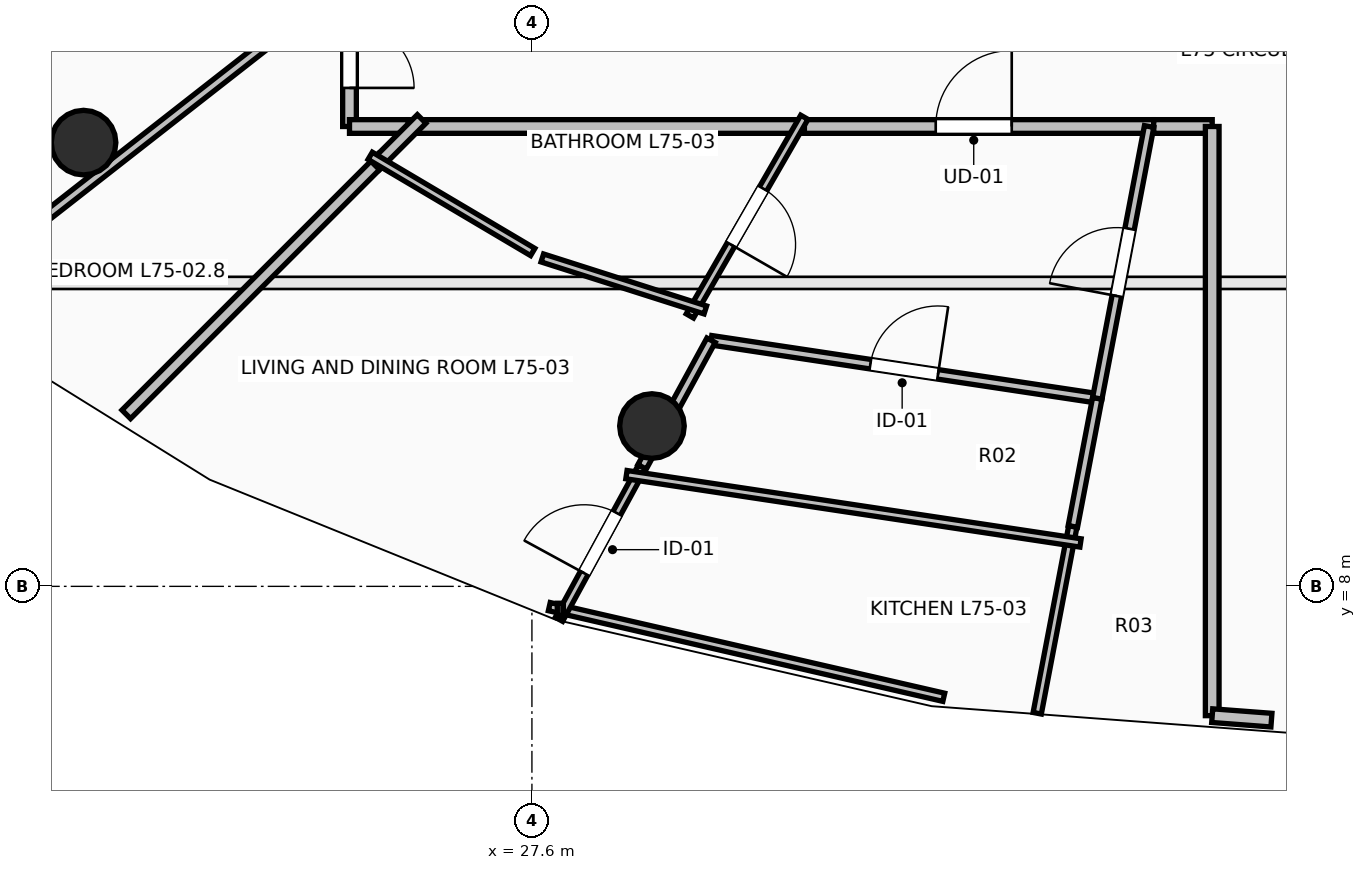
"""IFC4 building model, lengths in metres.
Left out: names, types, materials, properties, quantities, classifications, styles, units other than length and angle.
Written with IfcOpenShell. Run it as: python <this file> out.ifc"""

import sys

from ifc_helpers import new_model, si_unit, direction, frame, frame_2d, origin, origin_2d, place, context, subcontext, project, spatial, rectangle, circle, extrude, element, fill, save


model = new_model("IFC4")
c1 = context("Model", 3, precision=1e-05, world=origin(), true_north=direction((0.0, 1.0)))
c2 = subcontext(c1, "Body", "Model", "MODEL_VIEW")
j1 = project(units=[si_unit("LENGTHUNIT", "METRE"), si_unit("PLANEANGLEUNIT", "RADIAN")], contexts=[c1])
p1 = place(None, origin())
s1 = spatial("IfcSite", under=j1, at=p1, CompositionType="ELEMENT")
p2 = place(p1, origin())
s2 = spatial("IfcBuilding", under=s1, at=p2, CompositionType="ELEMENT")
p3 = place(p2, frame((0.0, 0.0, 276.85)))
s3 = spatial("IfcBuildingStorey", under=s2, at=p3, CompositionType="ELEMENT", Elevation=276.85)
for number, where, z_axis, x_axis in (
    (1, (21.701, 13.838, 0.0), (0.0, 0.0, 1.0), (-0.707, -0.707, 0.0)),
    (2, (29.179, 10.109, 0.0), (0.0, 0.0, 1.0), (-0.383, -0.924, 0.0)),
):
    element("IfcColumn", number, at=place(p3, frame(where, z_axis=z_axis, x_axis=x_axis)), inside=s3, PredefinedType="COLUMN", context=c2, shape_type="SweptSolid", body=[
        extrude(circle(Radius=0.425, at=origin_2d()), origin(), (0.0, 0.0, 1.0), 3.55),
    ])
p4 = place(p3, frame((25.2, 15.915, 0.0), z_axis=(0.0, 0.0, 1.0), x_axis=(0.0, -1.0, 0.0)))
e3 = element("IfcWall", 3, at=p4, inside=s3, PredefinedType="PARTITIONING", context=c2, shape_type="SweptSolid", body=[
    extrude(rectangle(XDim=1.865, YDim=0.18, at=frame_2d((0.933, 0.0))), origin(), (0.0, 0.0, 1.0), 2.382),
])
p5 = place(p4, frame((0.508, 0.0, 0.0)))
e4 = element("IfcOpeningElement", 4, at=p5, cuts=e3, PredefinedType="OPENING", context=c2, shape_type="SweptSolid", body=[
    extrude(rectangle(XDim=0.85, YDim=2.1, at=frame_2d((0.425, 1.05))), frame((0.0, 0.105, 0.0), z_axis=(0.0, -1.0, 0.0), x_axis=(1.0, 0.0, 0.0)), (0.0, 0.0, 1.0), 0.21),
])
p6 = place(p3, frame((25.2, 14.05, 0.0), z_axis=(0.0, 0.0, 1.0), x_axis=(1.0, 0.0, 0.0)))
e5 = element("IfcWall", 5, at=p6, inside=s3, PredefinedType="PARTITIONING", context=c2, shape_type="SweptSolid", body=[
    extrude(rectangle(XDim=0.91, YDim=0.18, at=frame_2d((0.455, 0.0))), origin(), (0.0, 0.0, 1.0), 3.19),
])
p7 = place(p3, frame((31.045, 14.05, 0.0), z_axis=(0.0, 0.0, 1.0), x_axis=(1.0, 0.0, 0.0)))
e6 = element("IfcWall", 6, at=p7, inside=s3, PredefinedType="PARTITIONING", context=c2, shape_type="SweptSolid", body=[
    extrude(rectangle(XDim=4.735, YDim=0.18, at=frame_2d((2.368, 0.0))), origin(), (0.0, 0.0, 1.0), 3.19),
])
p8 = place(p7, frame((1.867, 0.0, 0.0)))
e7 = element("IfcOpeningElement", 7, at=p8, cuts=e6, PredefinedType="OPENING", context=c2, shape_type="SweptSolid", body=[
    extrude(rectangle(XDim=1.0, YDim=2.15, at=frame_2d((0.5, 1.075))), frame((0.0, 0.105, 0.0), z_axis=(0.0, -1.0, 0.0), x_axis=(1.0, 0.0, 0.0)), (0.0, 0.0, 1.0), 0.21),
])
p9 = place(p3, frame((25.97, 14.05, 0.0), z_axis=(0.0, 0.0, 1.0), x_axis=(1.0, 0.0, 0.0)))
e8 = element("IfcWall", 8, at=p9, inside=s3, PredefinedType="PARTITIONING", context=c2, shape_type="SweptSolid", body=[
    extrude(rectangle(XDim=5.215, YDim=0.18, at=frame_2d((2.607, 0.0))), origin(), (0.0, 0.0, 1.0), 2.382),
])
p10 = place(p3, frame((35.78, 14.05, 0.0), z_axis=(0.0, 0.0, 1.0), x_axis=(1.0, 0.0, 0.0)))
e9 = element("IfcWall", 9, at=p10, inside=s3, PredefinedType="PARTITIONING", context=c2, shape_type="SweptSolid", body=[
    extrude(rectangle(XDim=0.77, YDim=0.18, at=frame_2d((0.385, 0.0))), origin(), (0.0, 0.0, 1.0), 3.19),
])
p11 = place(p3, frame((36.55, 14.05, 0.0), z_axis=(0.0, 0.0, 1.0), x_axis=(0.0, -1.0, 0.0)))
e10 = element("IfcWall", 10, at=p11, inside=s3, PredefinedType="PARTITIONING", context=c2, shape_type="SweptSolid", body=[
    extrude(rectangle(XDim=7.751, YDim=0.18, at=frame_2d((3.875, 0.0))), origin(), (0.0, 0.0, 1.0), 3.19),
])
p12 = place(p3, frame((36.55, 6.299, 0.0), z_axis=(0.0, 0.0, 1.0), x_axis=(0.997136622012, -0.0756211415, 0.0)))
e11 = element("IfcWall", 11, at=p12, inside=s3, PredefinedType="PARTITIONING", context=c2, shape_type="SweptSolid", body=[
    extrude(rectangle(XDim=0.781, YDim=0.18, at=frame_2d((0.391, 0.0))), origin(), (0.0, 0.0, 1.0), 3.19),
])
p13 = place(p3, frame((17.602, 13.72, 0.0), z_axis=(0.0, 0.0, 1.0), x_axis=(0.856734134601, 0.515758298633, 0.0)))
e12 = element("IfcWall", 12, at=p13, inside=s3, PredefinedType="PARTITIONING", context=c2, shape_type="SweptSolid", body=[
    extrude(rectangle(XDim=8.868, YDim=0.125, at=frame_2d((4.434, 0.0))), origin(), (0.0, 0.0, 1.0), 2.382),
])
p14 = place(p3, frame((19.819, 11.782, 0.0), z_axis=(0.0, 0.0, 1.0), x_axis=(0.78765580417, 0.61611552014, 0.0)))
e13 = element("IfcWall", 13, at=p14, inside=s3, PredefinedType="PARTITIONING", context=c2, shape_type="SweptSolid", body=[
    extrude(rectangle(XDim=6.832, YDim=0.125, at=frame_2d((3.416, 0.0))), origin(), (0.0, 0.0, 1.0), 2.382),
])
p15 = place(p3, frame((22.263, 10.263, 0.0), z_axis=(0.0, 0.0, 1.0), x_axis=(0.707106781187, 0.707106781187, 0.0)))
e14 = element("IfcWall", 14, at=p15, inside=s3, PredefinedType="PARTITIONING", context=c2, shape_type="SweptSolid", body=[
    extrude(rectangle(XDim=4.771, YDim=0.16, at=frame_2d((2.386, 0.0))), origin(), (0.0, 0.0, 1.0), 2.774),
])
p16 = place(p3, frame((25.538, 13.538, 0.0), z_axis=(0.0, 0.0, 1.0), x_axis=(0.707106781187, 0.707106781187, 0.0)))
e15 = element("IfcWall", 15, at=p16, inside=s3, PredefinedType="PARTITIONING", context=c2, shape_type="SweptSolid", body=[
    extrude(rectangle(XDim=0.864, YDim=0.16, at=frame_2d((0.432, 0.0))), origin(), (0.0, 0.0, 1.0), 3.19),
])
p17 = place(p3, frame((31.184, 14.171, 0.0), z_axis=(0.0, 0.0, 1.0), x_axis=(-0.499203880251, -0.86648455609, 0.0)))
e16 = element("IfcWall", 16, at=p17, inside=s3, PredefinedType="PARTITIONING", context=c2, shape_type="SweptSolid", body=[
    extrude(rectangle(XDim=3.017, YDim=0.11, at=frame_2d((1.508, 0.0))), origin(), (0.0, 0.0, 1.0), 3.19),
])
p18 = place(p17, frame((1.083, 0.0, 0.0)))
e17 = element("IfcOpeningElement", 17, at=p18, cuts=e16, PredefinedType="OPENING", context=c2, shape_type="SweptSolid", body=[
    extrude(rectangle(XDim=0.85, YDim=2.1, at=frame_2d((0.425, 1.05))), frame((0.0, 0.07, 0.0), z_axis=(0.0, -1.0, 0.0), x_axis=(1.0, 0.0, 0.0)), (0.0, 0.0, 1.0), 0.14),
])
p19 = place(p3, frame((29.881, 11.636, 0.0), z_axis=(0.0, 0.0, 1.0), x_axis=(-0.952713330874, 0.30387054674, 0.0)))
e18 = element("IfcWall", 18, at=p19, inside=s3, PredefinedType="PARTITIONING", context=c2, shape_type="SweptSolid", body=[
    extrude(rectangle(XDim=2.251, YDim=0.11, at=frame_2d((1.125, 0.0))), origin(), (0.0, 0.0, 1.0), 2.382),
])
p20 = place(p3, frame((27.611, 12.399, 0.0), z_axis=(0.0, 0.0, 1.0), x_axis=(-0.860546797705, 0.509371386082, 0.0)))
e19 = element("IfcWall", 19, at=p20, inside=s3, PredefinedType="PARTITIONING", context=c2, shape_type="SweptSolid", body=[
    extrude(rectangle(XDim=2.485, YDim=0.11, at=frame_2d((1.242, 0.0))), origin(), (0.0, 0.0, 1.0), 3.19),
])
p21 = place(p3, frame((34.716, 8.789, 0.0), z_axis=(0.0, 0.0, 1.0), x_axis=(-0.187233159216, -0.982315501298, 0.0)))
e20 = element("IfcWall", 20, at=p21, inside=s3, PredefinedType="PARTITIONING", context=c2, shape_type="SweptSolid", body=[
    extrude(rectangle(XDim=2.502, YDim=0.11, at=frame_2d((1.251, 0.0))), origin(), (0.0, 0.0, 1.0), 3.19),
])
p22 = place(p3, frame((27.829, 7.733, 0.0), z_axis=(0.0, 0.0, 1.0), x_axis=(0.974586324437, -0.224012268015, 0.0)))
e21 = element("IfcWall", 21, at=p22, inside=s3, PredefinedType="PARTITIONING", context=c2, shape_type="SweptSolid", body=[
    extrude(rectangle(XDim=5.325, YDim=0.11, at=frame_2d((2.663, 0.0))), origin(), (0.0, 0.0, 1.0), 3.19),
])
p23 = place(p3, frame((27.956, 7.566, 0.0), z_axis=(0.0, 0.0, 1.0), x_axis=(0.478485169604, 0.878095634011, 0.0)))
e22 = element("IfcWall", 22, at=p23, inside=s3, PredefinedType="PARTITIONING", context=c2, shape_type="SweptSolid", body=[
    extrude(rectangle(XDim=2.284, YDim=0.11, at=frame_2d((1.142, 0.0))), origin(), (0.0, 0.0, 1.0), 3.19),
])
p24 = place(p23, frame((0.692, 0.0, 0.0)))
e23 = element("IfcOpeningElement", 23, at=p24, cuts=e22, PredefinedType="OPENING", context=c2, shape_type="SweptSolid", body=[
    extrude(rectangle(XDim=0.9, YDim=2.1, at=frame_2d((0.45, 1.05))), frame((0.0, 0.07, 0.0), z_axis=(0.0, -1.0, 0.0), x_axis=(1.0, 0.0, 0.0)), (0.0, 0.0, 1.0), 0.14),
])
p25 = place(p3, frame((29.957, 11.238, 0.0), z_axis=(0.0, 0.0, 1.0), x_axis=(0.988886109078, -0.148675025721, 0.0)))
e24 = element("IfcWall", 24, at=p25, inside=s3, PredefinedType="PARTITIONING", context=c2, shape_type="SweptSolid", body=[
    extrude(rectangle(XDim=5.138, YDim=0.125, at=frame_2d((2.569, 0.0))), origin(), (0.0, 0.0, 1.0), 3.19),
])
p26 = place(p25, frame((2.119, 0.0, 0.0)))
e25 = element("IfcOpeningElement", 25, at=p26, cuts=e24, PredefinedType="OPENING", context=c2, shape_type="SweptSolid", body=[
    extrude(rectangle(XDim=0.9, YDim=2.1, at=frame_2d((0.45, 1.05))), frame((0.0, 0.077, 0.0), z_axis=(0.0, -1.0, 0.0), x_axis=(1.0, 0.0, 0.0)), (0.0, 0.0, 1.0), 0.155),
])
p27 = place(p3, frame((35.038, 10.474, 0.0), z_axis=(0.0, 0.0, 1.0), x_axis=(-0.187353972187, -0.982292466176, 0.0)))
e26 = element("IfcWall", 26, at=p27, inside=s3, PredefinedType="PARTITIONING", context=c2, shape_type="SweptSolid", body=[
    extrude(rectangle(XDim=1.716, YDim=0.125, at=frame_2d((0.858, 0.0))), origin(), (0.0, 0.0, 1.0), 3.19),
])
p28 = place(p3, frame((29.049, 9.572, 0.0), z_axis=(0.0, 0.0, 1.0), x_axis=(0.478536562944, 0.878067627194, 0.0)))
e27 = element("IfcWall", 27, at=p28, inside=s3, PredefinedType="PARTITIONING", context=c2, shape_type="SweptSolid", body=[
    extrude(rectangle(XDim=1.897, YDim=0.125, at=frame_2d((0.949, 0.0))), origin(), (0.0, 0.0, 1.0), 3.19),
])
p29 = place(p3, frame((35.038, 10.474, 0.0), z_axis=(0.0, 0.0, 1.0), x_axis=(0.187312418361, 0.982300390882, 0.0)))
e28 = element("IfcWall", 28, at=p29, inside=s3, PredefinedType="PARTITIONING", context=c2, shape_type="SweptSolid", body=[
    extrude(rectangle(XDim=3.64, YDim=0.125, at=frame_2d((1.82, 0.0))), origin(), (0.0, 0.0, 1.0), 3.19),
])
p30 = place(p29, frame((1.37, 0.0, 0.0)))
e29 = element("IfcOpeningElement", 29, at=p30, cuts=e28, PredefinedType="OPENING", context=c2, shape_type="SweptSolid", body=[
    extrude(rectangle(XDim=0.9, YDim=2.1, at=frame_2d((0.45, 1.05))), frame((0.0, 0.077, 0.0), z_axis=(0.0, -1.0, 0.0), x_axis=(1.0, 0.0, 0.0)), (0.0, 0.0, 1.0), 0.155),
])
p31 = place(p3, frame((34.817, 8.571, 0.0), z_axis=(0.0, 0.0, 1.0), x_axis=(-0.988879067965, 0.148721850918, 0.0)))
e30 = element("IfcWall", 30, at=p31, inside=s3, PredefinedType="PARTITIONING", context=c2, shape_type="SweptSolid", body=[
    extrude(rectangle(XDim=6.041, YDim=0.11, at=frame_2d((3.021, 0.0))), origin(), (0.0, 0.0, 1.0), 3.19),
])
p32 = place(p8, origin())
e31 = element("IfcDoor", 31, at=p32, inside=s3, OperationType="SINGLE_SWING_RIGHT", PredefinedType="DOOR", context=c2, shape_type="SweptSolid", body=[
    extrude(rectangle(XDim=1.0, YDim=2.15, at=frame_2d((0.5, 1.075))), frame((0.0, 0.025, 0.0), z_axis=(0.0, -1.0, 0.0), x_axis=(1.0, 0.0, 0.0)), (0.0, 0.0, 1.0), 0.05),
])
fill(e7, e31)
p33 = place(p18, origin())
e32 = element("IfcDoor", 32, at=p33, inside=s3, OperationType="SINGLE_SWING_RIGHT", PredefinedType="DOOR", context=c2, shape_type="SweptSolid", body=[
    extrude(rectangle(XDim=0.85, YDim=2.1, at=frame_2d((0.425, 1.05))), frame((0.0, 0.025, 0.0), z_axis=(0.0, -1.0, 0.0), x_axis=(1.0, 0.0, 0.0)), (0.0, 0.0, 1.0), 0.05),
])
fill(e17, e32)
p34 = place(p24, origin())
e33 = element("IfcDoor", 33, at=p34, inside=s3, OperationType="SINGLE_SWING_LEFT", PredefinedType="DOOR", context=c2, shape_type="SweptSolid", body=[
    extrude(rectangle(XDim=0.9, YDim=2.1, at=frame_2d((0.45, 1.05))), frame((0.0, 0.025, 0.0), z_axis=(0.0, -1.0, 0.0), x_axis=(1.0, 0.0, 0.0)), (0.0, 0.0, 1.0), 0.05),
])
fill(e23, e33)
p35 = place(p26, origin())
e34 = element("IfcDoor", 34, at=p35, inside=s3, OperationType="SINGLE_SWING_RIGHT", PredefinedType="DOOR", context=c2, shape_type="SweptSolid", body=[
    extrude(rectangle(XDim=0.9, YDim=2.1, at=frame_2d((0.45, 1.05))), frame((0.0, 0.025, 0.0), z_axis=(0.0, -1.0, 0.0), x_axis=(1.0, 0.0, 0.0)), (0.0, 0.0, 1.0), 0.05),
])
fill(e25, e34)
p36 = place(p30, origin())
e35 = element("IfcDoor", 35, at=p36, inside=s3, OperationType="SINGLE_SWING_LEFT", PredefinedType="DOOR", context=c2, shape_type="SweptSolid", body=[
    extrude(rectangle(XDim=0.9, YDim=2.1, at=frame_2d((0.45, 1.05))), frame((0.0, 0.025, 0.0), z_axis=(0.0, -1.0, 0.0), x_axis=(1.0, 0.0, 0.0)), (0.0, 0.0, 1.0), 0.05),
])
fill(e29, e35)
p37 = place(p5, origin())
e36 = element("IfcDoor", 36, at=p37, inside=s3, OperationType="SINGLE_SWING_RIGHT", PredefinedType="DOOR", context=c2, shape_type="SweptSolid", body=[
    extrude(rectangle(XDim=0.85, YDim=2.1, at=frame_2d((0.425, 1.05))), frame((0.0, 0.025, 0.0), z_axis=(0.0, -1.0, 0.0), x_axis=(1.0, 0.0, 0.0)), (0.0, 0.0, 1.0), 0.05),
])
fill(e4, e36)
save(model, sys.argv[1])
